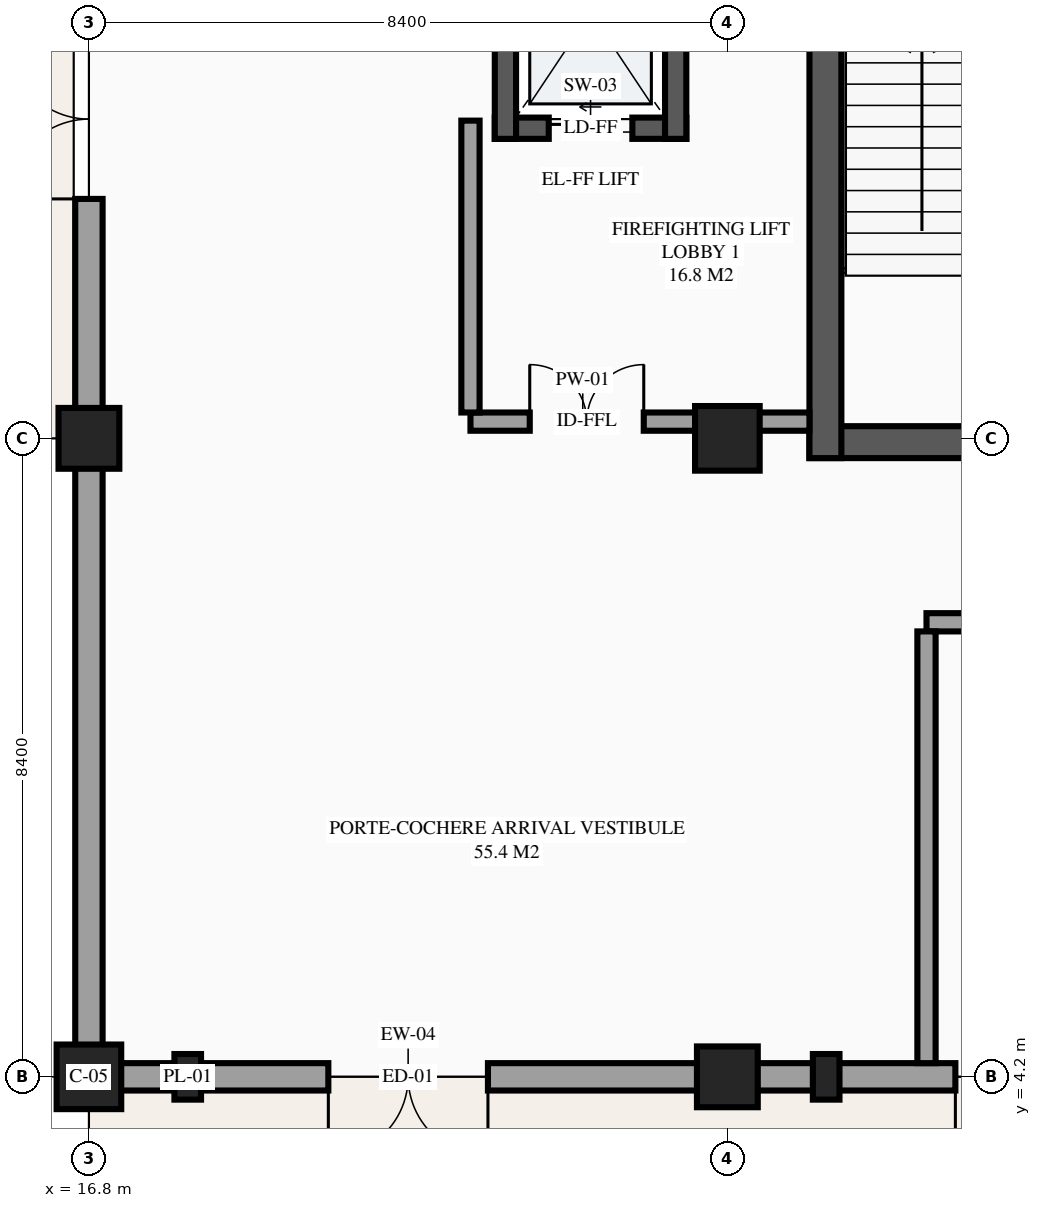
"""IFC4 building model, lengths in metres.
Left out: names, types, materials, properties, quantities, classifications, styles, units other than length and angle.
Written with IfcOpenShell. Run it as: python <this file> out.ifc"""

import sys

from ifc_helpers import new_model, si_unit, direction, frame, frame_2d, origin, origin_2d, place, context, subcontext, project, spatial, rectangle, extrude, element, fill, save


model = new_model("IFC4")
c1 = context("Model", 3, precision=1e-05, world=origin(), true_north=direction((0.0, 1.0)))
c2 = subcontext(c1, "Body", "Model", "MODEL_VIEW")
j1 = project(units=[si_unit("LENGTHUNIT", "METRE"), si_unit("PLANEANGLEUNIT", "RADIAN")], contexts=[c1])
p1 = place(None, origin())
s1 = spatial("IfcSite", under=j1, at=p1, CompositionType="ELEMENT")
p2 = place(p1, origin())
s2 = spatial("IfcBuilding", under=s1, at=p2, CompositionType="ELEMENT")
p3 = place(p2, origin())
s3 = spatial("IfcBuildingStorey", under=s2, at=p3, CompositionType="ELEMENT", Elevation=0.0)
p4 = place(p3, frame((16.8, 4.2, 0.0), z_axis=(0.0, 0.0, 1.0), x_axis=(1.0, 0.0, 0.0)))
e1 = element("IfcColumn", 1, at=p4, inside=s3, PredefinedType="COLUMN", context=c2, shape_type="SweptSolid", body=[
    extrude(rectangle(XDim=0.85, YDim=0.85, at=origin_2d()), origin(), (0.0, 0.0, 1.0), 5.4),
])
for number, where, z_axis, x_axis in (
    (2, (16.8, 12.6, 0.0), (0.0, 0.0, 1.0), (1.0, 0.0, 0.0)),
    (3, (25.2, 4.2, 0.0), (0.0, 0.0, 1.0), (1.0, 0.0, 0.0)),
):
    element("IfcColumn", number, at=place(p3, frame(where, z_axis=z_axis, x_axis=x_axis)), inside=s3, PredefinedType="COLUMN", context=c2, shape_type="SweptSolid", body=[
        extrude(rectangle(XDim=0.8, YDim=0.8, at=origin_2d()), origin(), (0.0, 0.0, 1.0), 5.4),
    ])
p5 = place(p3, frame((25.2, 12.6, 0.0), z_axis=(0.0, 0.0, 1.0), x_axis=(1.0, 0.0, 0.0)))
e4 = element("IfcColumn", 4, at=p5, inside=s3, PredefinedType="COLUMN", context=c2, shape_type="SweptSolid", body=[
    extrude(rectangle(XDim=0.85, YDim=0.85, at=origin_2d()), origin(), (0.0, 0.0, 1.0), 5.4),
])
for number, where, z_axis, x_axis in (
    (5, (18.1, 4.2, 0.0), (0.0, 0.0, 1.0), (1.0, 0.0, 0.0)),
    (6, (26.5, 4.2, 0.0), (0.0, 0.0, 1.0), (1.0, 0.0, 0.0)),
):
    element("IfcColumn", number, at=place(p3, frame(where, z_axis=z_axis, x_axis=x_axis)), inside=s3, PredefinedType="PILASTER", context=c2, shape_type="SweptSolid", body=[
        extrude(rectangle(XDim=0.35, YDim=0.6, at=origin_2d()), origin(), (0.0, 0.0, 1.0), 5.4),
    ])
p6 = place(p3, frame((16.8, 4.2, 0.0), z_axis=(0.0, 0.0, 1.0), x_axis=(1.0, 0.0, 0.0)))
e7 = element("IfcWall", 7, at=p6, inside=s3, PredefinedType="STANDARD", context=c2, shape_type="SweptSolid", body=[
    extrude(rectangle(XDim=8.4, YDim=0.36, at=frame_2d((4.2, 0.0))), origin(), (0.0, 0.0, 1.0), 4.39),
])
p7 = place(p6, frame((5.25, 0.0, 0.0), z_axis=(0.0, 0.0, 1.0), x_axis=(-1.0, 0.0, 0.0)))
e8 = element("IfcOpeningElement", 8, at=p7, cuts=e7, PredefinedType="OPENING", context=c2, shape_type="SweptSolid", body=[
    extrude(rectangle(XDim=2.1, YDim=2.4, at=frame_2d((1.05, 1.2))), frame((0.0, 0.19, 0.0), z_axis=(0.0, -1.0, 0.0), x_axis=(1.0, 0.0, 0.0)), (0.0, 0.0, 1.0), 0.38),
])
p8 = place(p3, frame((25.2, 4.2, 0.0), z_axis=(0.0, 0.0, 1.0), x_axis=(1.0, 0.0, 0.0)))
e9 = element("IfcWall", 9, at=p8, inside=s3, PredefinedType="STANDARD", context=c2, shape_type="SweptSolid", body=[
    extrude(rectangle(XDim=8.4, YDim=0.36, at=frame_2d((4.2, 0.0))), origin(), (0.0, 0.0, 1.0), 4.83),
])
p9 = place(p8, frame((5.4, 0.0, 0.0), z_axis=(0.0, 0.0, 1.0), x_axis=(-1.0, 0.0, 0.0)))
e10 = element("IfcOpeningElement", 10, at=p9, cuts=e9, PredefinedType="OPENING", context=c2, shape_type="SweptSolid", body=[
    extrude(rectangle(XDim=2.4, YDim=2.6, at=frame_2d((1.2, 1.3))), frame((0.0, 0.19, 0.0), z_axis=(0.0, -1.0, 0.0), x_axis=(1.0, 0.0, 0.0)), (0.0, 0.0, 1.0), 0.38),
])
p10 = place(p3, frame((16.8, 21.0, 0.0), z_axis=(0.0, 0.0, 1.0), x_axis=(0.0, -1.0, 0.0)))
e11 = element("IfcWall", 11, at=p10, inside=s3, PredefinedType="STANDARD", context=c2, shape_type="SweptSolid", body=[
    extrude(rectangle(XDim=8.4, YDim=0.36, at=frame_2d((4.2, 0.0))), origin(), (0.0, 0.0, 1.0), 4.19),
])
p11 = place(p10, frame((5.25, 0.0, 0.0), z_axis=(0.0, 0.0, 1.0), x_axis=(-1.0, 0.0, 0.0)))
e12 = element("IfcOpeningElement", 12, at=p11, cuts=e11, PredefinedType="OPENING", context=c2, shape_type="SweptSolid", body=[
    extrude(rectangle(XDim=2.1, YDim=2.4, at=frame_2d((1.05, 1.2))), frame((0.0, 0.19, 0.0), z_axis=(0.0, -1.0, 0.0), x_axis=(1.0, 0.0, 0.0)), (0.0, 0.0, 1.0), 0.38),
])
p12 = place(p3, frame((16.8, 12.6, 0.0), z_axis=(0.0, 0.0, 1.0), x_axis=(0.0, -1.0, 0.0)))
e13 = element("IfcWall", 13, at=p12, inside=s3, PredefinedType="STANDARD", context=c2, shape_type="SweptSolid", body=[
    extrude(rectangle(XDim=8.4, YDim=0.36, at=frame_2d((4.2, 0.0))), origin(), (0.0, 0.0, 1.0), 4.54),
])
p13 = place(p3, frame((22.14, 16.68, 0.0), z_axis=(0.0, 0.0, 1.0), x_axis=(1.0, 0.0, 0.0)))
e14 = element("IfcWall", 14, at=p13, inside=s3, PredefinedType="SHEAR", context=c2, shape_type="SweptSolid", body=[
    extrude(rectangle(XDim=2.52, YDim=0.28, at=frame_2d((1.26, 0.0))), origin(), (0.0, 0.0, 1.0), 5.4),
])
p14 = place(p13, frame((0.71, 0.0, 0.0)))
e15 = element("IfcOpeningElement", 15, at=p14, cuts=e14, PredefinedType="OPENING", context=c2, shape_type="SweptSolid", body=[
    extrude(rectangle(XDim=1.1, YDim=2.2, at=frame_2d((0.55, 1.1))), frame((0.0, 0.15, 0.0), z_axis=(0.0, -1.0, 0.0), x_axis=(1.0, 0.0, 0.0)), (0.0, 0.0, 1.0), 0.3),
])
for number, where, z_axis, x_axis in (
    (16, (24.52, 16.54, 0.0), (0.0, 0.0, 1.0), (0.0, 1.0, 0.0)),
    (17, (22.28, 19.86, 0.0), (0.0, 0.0, 1.0), (0.0, -1.0, 0.0)),
):
    element("IfcWall", number, at=place(p3, frame(where, z_axis=z_axis, x_axis=x_axis)), inside=s3, PredefinedType="SHEAR", context=c2, shape_type="SweptSolid", body=[
        extrude(rectangle(XDim=3.32, YDim=0.28, at=frame_2d((1.66, 0.0))), origin(), (0.0, 0.0, 1.0), 5.4),
    ])
p15 = place(p3, frame((26.28, 12.55, 0.0), z_axis=(0.0, 0.0, 1.0), x_axis=(1.0, 0.0, 0.0)))
e18 = element("IfcWall", 18, at=p15, inside=s3, PredefinedType="SHEAR", context=c2, shape_type="SweptSolid", body=[
    extrude(rectangle(XDim=5.44, YDim=0.42, at=frame_2d((2.72, 0.0))), origin(), (0.0, 0.0, 1.0), 5.4),
])
p16 = place(p15, frame((3.295, 0.0, 0.0), z_axis=(0.0, 0.0, 1.0), x_axis=(-1.0, 0.0, 0.0)))
e19 = element("IfcOpeningElement", 19, at=p16, cuts=e18, PredefinedType="OPENING", context=c2, shape_type="SweptSolid", body=[
    extrude(rectangle(XDim=1.15, YDim=2.15, at=frame_2d((0.575, 1.075))), frame((0.0, 0.22, 0.0), z_axis=(0.0, -1.0, 0.0), x_axis=(1.0, 0.0, 0.0)), (0.0, 0.0, 1.0), 0.44),
])
p17 = place(p3, frame((26.49, 21.42, 0.0), z_axis=(0.0, 0.0, 1.0), x_axis=(0.0, -1.0, 0.0)))
e20 = element("IfcWall", 20, at=p17, inside=s3, PredefinedType="SHEAR", context=c2, shape_type="SweptSolid", body=[
    extrude(rectangle(XDim=9.08, YDim=0.42, at=frame_2d((4.54, 0.0))), origin(), (0.0, 0.0, 1.0), 5.4),
])
p18 = place(p3, frame((21.82, 12.82, 0.0), z_axis=(0.0, 0.0, 1.0), x_axis=(1.0, 0.0, 0.0)))
e21 = element("IfcWall", 21, at=p18, inside=s3, PredefinedType="PARTITIONING", context=c2, shape_type="SweptSolid", body=[
    extrude(rectangle(XDim=2.955, YDim=0.24, at=frame_2d((1.478, 0.0))), origin(), (0.0, 0.0, 1.0), 4.29),
])
p19 = place(p18, frame((0.78, 0.0, 0.0)))
e22 = element("IfcOpeningElement", 22, at=p19, cuts=e21, PredefinedType="OPENING", context=c2, shape_type="SweptSolid", body=[
    extrude(rectangle(XDim=1.5, YDim=2.15, at=frame_2d((0.75, 1.075))), frame((0.0, 0.13, 0.0), z_axis=(0.0, -1.0, 0.0), x_axis=(1.0, 0.0, 0.0)), (0.0, 0.0, 1.0), 0.26),
])
p20 = place(p3, frame((21.82, 12.94, 0.0), z_axis=(0.0, 0.0, 1.0), x_axis=(0.0, 1.0, 0.0)))
e23 = element("IfcWall", 23, at=p20, inside=s3, PredefinedType="PARTITIONING", context=c2, shape_type="SweptSolid", body=[
    extrude(rectangle(XDim=3.84, YDim=0.24, at=frame_2d((1.92, 0.0))), origin(), (0.0, 0.0, 1.0), 5.135),
])
p21 = place(p3, frame((27.82, 10.18, 0.0), z_axis=(0.0, 0.0, 1.0), x_axis=(1.0, 0.0, 0.0)))
e24 = element("IfcWall", 24, at=p21, inside=s3, PredefinedType="PARTITIONING", context=c2, shape_type="SweptSolid", body=[
    extrude(rectangle(XDim=7.76, YDim=0.24, at=frame_2d((3.88, 0.0))), origin(), (0.0, 0.0, 1.0), 5.135),
])
p22 = place(p21, frame((2.83, 0.0, 0.0)))
e25 = element("IfcOpeningElement", 25, at=p22, cuts=e24, PredefinedType="OPENING", context=c2, shape_type="SweptSolid", body=[
    extrude(rectangle(XDim=1.4, YDim=2.2, at=frame_2d((0.7, 1.1))), frame((0.0, 0.13, 0.0), z_axis=(0.0, -1.0, 0.0), x_axis=(1.0, 0.0, 0.0)), (0.0, 0.0, 1.0), 0.26),
])
p23 = place(p3, frame((27.82, 4.38, 0.0), z_axis=(0.0, 0.0, 1.0), x_axis=(0.0, 1.0, 0.0)))
e26 = element("IfcWall", 26, at=p23, inside=s3, PredefinedType="PARTITIONING", context=c2, shape_type="SweptSolid", body=[
    extrude(rectangle(XDim=5.68, YDim=0.24, at=frame_2d((2.84, 0.0))), origin(), (0.0, 0.0, 1.0), 5.135),
])
p24 = place(p3, frame((24.775, 12.82, 0.0), z_axis=(0.0, 0.0, 1.0), x_axis=(1.0, 0.0, 0.0)))
e27 = element("IfcWall", 27, at=p24, inside=s3, PredefinedType="PARTITIONING", context=c2, shape_type="SweptSolid", body=[
    extrude(rectangle(XDim=1.505, YDim=0.24, at=frame_2d((0.752, 0.0))), origin(), (0.0, 0.0, 1.0), 5.135),
])
p25 = place(p7, origin())
e28 = element("IfcDoor", 28, at=p25, inside=s3, OperationType="DOUBLE_DOOR_SINGLE_SWING", PredefinedType="DOOR", context=c2, shape_type="SweptSolid", body=[
    extrude(rectangle(XDim=2.1, YDim=2.4, at=frame_2d((1.05, 1.2))), frame((0.0, 0.025, 0.0), z_axis=(0.0, -1.0, 0.0), x_axis=(1.0, 0.0, 0.0)), (0.0, 0.0, 1.0), 0.05),
])
fill(e8, e28)
p26 = place(p9, origin())
e29 = element("IfcDoor", 29, at=p26, inside=s3, OperationType="DOUBLE_DOOR_SINGLE_SWING", PredefinedType="DOOR", context=c2, shape_type="SweptSolid", body=[
    extrude(rectangle(XDim=2.4, YDim=2.6, at=frame_2d((1.2, 1.3))), frame((0.0, 0.025, 0.0), z_axis=(0.0, -1.0, 0.0), x_axis=(1.0, 0.0, 0.0)), (0.0, 0.0, 1.0), 0.05),
])
fill(e10, e29)
p27 = place(p11, origin())
e30 = element("IfcDoor", 30, at=p27, inside=s3, OperationType="DOUBLE_DOOR_SINGLE_SWING", PredefinedType="DOOR", context=c2, shape_type="SweptSolid", body=[
    extrude(rectangle(XDim=2.1, YDim=2.4, at=frame_2d((1.05, 1.2))), frame((0.0, 0.025, 0.0), z_axis=(0.0, -1.0, 0.0), x_axis=(1.0, 0.0, 0.0)), (0.0, 0.0, 1.0), 0.05),
])
fill(e12, e30)
p28 = place(p14, origin())
e31 = element("IfcDoor", 31, at=p28, inside=s3, OperationType="SLIDING_TO_LEFT", PredefinedType="DOOR", context=c2, shape_type="SweptSolid", body=[
    extrude(rectangle(XDim=1.1, YDim=2.2, at=frame_2d((0.55, 1.1))), frame((0.0, 0.025, 0.0), z_axis=(0.0, -1.0, 0.0), x_axis=(1.0, 0.0, 0.0)), (0.0, 0.0, 1.0), 0.05),
])
fill(e15, e31)
p29 = place(p19, origin())
e32 = element("IfcDoor", 32, at=p29, inside=s3, OperationType="DOUBLE_DOOR_SINGLE_SWING", PredefinedType="DOOR", context=c2, shape_type="SweptSolid", body=[
    extrude(rectangle(XDim=1.5, YDim=2.15, at=frame_2d((0.75, 1.075))), frame((0.0, 0.025, 0.0), z_axis=(0.0, -1.0, 0.0), x_axis=(1.0, 0.0, 0.0)), (0.0, 0.0, 1.0), 0.05),
])
fill(e22, e32)
save(model, sys.argv[1])
